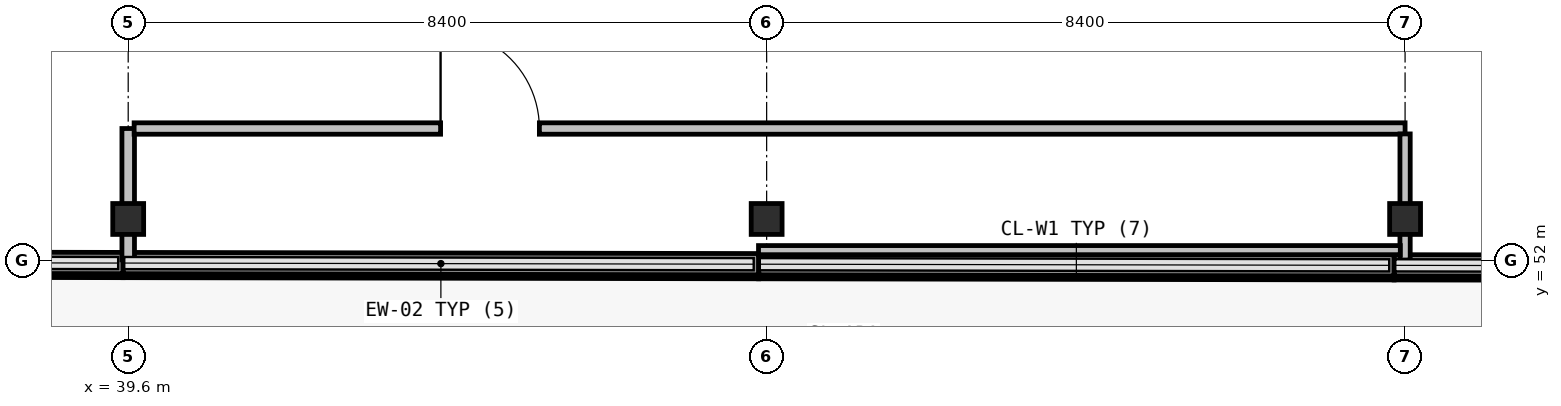
"""IFC4 building model, lengths in metres.
Left out: names, types, materials, properties, quantities, classifications, styles, units other than length and angle.
Written with IfcOpenShell. Run it as: python <this file> out.ifc"""

import sys

from ifc_helpers import new_model, si_unit, direction, frame, frame_2d, origin, origin_2d, place, context, subcontext, project, spatial, rectangle, hollow_circle, extrude, element, fill, save


model = new_model("IFC4")
c1 = context("Model", 3, precision=1e-05, world=origin(), true_north=direction((0.0, 1.0)))
c2 = subcontext(c1, "Body", "Model", "MODEL_VIEW")
j1 = project(units=[si_unit("LENGTHUNIT", "METRE"), si_unit("PLANEANGLEUNIT", "RADIAN")], contexts=[c1])
p1 = place(None, origin())
s1 = spatial("IfcSite", under=j1, at=p1, CompositionType="ELEMENT")
p2 = place(p1, origin())
s2 = spatial("IfcBuilding", under=s1, at=p2, CompositionType="ELEMENT")
p3 = place(p2, origin())
s3 = spatial("IfcBuildingStorey", under=s2, at=p3, CompositionType="ELEMENT", Elevation=0.0)
for number, where, z_axis, x_axis in (
    (1, (39.6, 52.55, 0.0), (0.0, 0.0, 1.0), (1.0, 0.0, 0.0)),
    (2, (48.0, 52.55, 0.0), (0.0, 0.0, 1.0), (1.0, 0.0, 0.0)),
    (3, (56.4, 52.55, 0.0), (0.0, 0.0, 1.0), (1.0, 0.0, 0.0)),
):
    element("IfcColumn", number, at=place(p3, frame(where, z_axis=z_axis, x_axis=x_axis)), inside=s3, PredefinedType="COLUMN", context=c2, shape_type="SweptSolid", body=[
        extrude(hollow_circle(Radius=0.203, WallThickness=0.016, at=origin_2d()), origin(), (0.0, 0.0, 1.0), 5.4),
    ])
p4 = place(p3, frame((64.616, 51.925, 0.0), z_axis=(0.0, 0.0, 1.0), x_axis=(-0.999998412501, 0.001781851468, 0.0)))
e4 = element("IfcWall", 4, at=p4, inside=s3, PredefinedType="SOLIDWALL", context=c2, shape_type="SweptSolid", body=[
    extrude(rectangle(XDim=8.358, YDim=0.28, at=frame_2d((4.179, 0.0))), origin(), (0.0, 0.0, 1.0), 0.94),
])
p5 = place(p3, frame((56.254, 51.94, 0.0), z_axis=(0.0, 0.0, 1.0), x_axis=(-0.999998359642, 0.001811273687, 0.0)))
e5 = element("IfcWall", 5, at=p5, inside=s3, PredefinedType="SOLIDWALL", context=c2, shape_type="SweptSolid", body=[
    extrude(rectangle(XDim=8.357, YDim=0.28, at=frame_2d((4.178, 0.0))), origin(), (0.0, 0.0, 1.0), 0.94),
])
p6 = place(p3, frame((47.893, 51.955, 0.0), z_axis=(0.0, 0.0, 1.0), x_axis=(-0.999998412594, 0.001781799421, 0.0)))
e6 = element("IfcWall", 6, at=p6, inside=s3, PredefinedType="SOLIDWALL", context=c2, shape_type="SweptSolid", body=[
    extrude(rectangle(XDim=8.358, YDim=0.28, at=frame_2d((4.179, 0.0))), origin(), (0.0, 0.0, 1.0), 0.94),
])
p7 = place(p3, frame((39.531, 51.97, 0.0), z_axis=(0.0, 0.0, 1.0), x_axis=(-0.999998360026, 0.001811062053, 0.0)))
e7 = element("IfcWall", 7, at=p7, inside=s3, PredefinedType="SOLIDWALL", context=c2, shape_type="SweptSolid", body=[
    extrude(rectangle(XDim=8.358, YDim=0.28, at=frame_2d((4.179, 0.0))), origin(), (0.0, 0.0, 1.0), 0.94),
])
p8 = place(p3, frame((39.6, 52.012, 0.0), z_axis=(0.0, 0.0, 1.0), x_axis=(0.0, 1.0, 0.0)))
e8 = element("IfcWall", 8, at=p8, inside=s3, PredefinedType="PARTITIONING", context=c2, shape_type="SweptSolid", body=[
    extrude(rectangle(XDim=1.728, YDim=0.165, at=frame_2d((0.864, 0.0))), origin(), (0.0, 0.0, 1.0), 4.33),
])
p9 = place(p3, frame((39.678, 53.74, 0.0), z_axis=(0.0, 0.0, 1.0), x_axis=(1.0, 0.0, 0.0)))
e9 = element("IfcWall", 9, at=p9, inside=s3, PredefinedType="PARTITIONING", context=c2, shape_type="SweptSolid", body=[
    extrude(rectangle(XDim=16.722, YDim=0.15, at=frame_2d((8.361, 0.0))), origin(), (0.0, 0.0, 1.0), 5.08),
])
p10 = place(p9, frame((4.032, 0.0, 0.0)))
e10 = element("IfcOpeningElement", 10, at=p10, cuts=e9, PredefinedType="OPENING", context=c2, shape_type="SweptSolid", body=[
    extrude(rectangle(XDim=1.3, YDim=2.15, at=frame_2d((0.65, 1.075))), frame((0.0, 0.085, 0.0), z_axis=(0.0, -1.0, 0.0), x_axis=(1.0, 0.0, 0.0)), (0.0, 0.0, 1.0), 0.17),
])
p11 = place(p3, frame((56.4, 53.669, 0.0), z_axis=(0.0, 0.0, 1.0), x_axis=(0.0, -1.0, 0.0)))
e11 = element("IfcWall", 11, at=p11, inside=s3, PredefinedType="PARTITIONING", context=c2, shape_type="SweptSolid", body=[
    extrude(rectangle(XDim=1.659, YDim=0.135, at=frame_2d((0.83, 0.0))), origin(), (0.0, 0.0, 1.0), 4.76),
])
p12 = place(p3, frame((56.337, 52.14, 0.0), z_axis=(0.0, 0.0, 1.0), x_axis=(-1.0, 0.0, 0.0)))
e12 = element("IfcWall", 12, at=p12, inside=s3, PredefinedType="PARTITIONING", context=c2, shape_type="SweptSolid", body=[
    extrude(rectangle(XDim=8.444, YDim=0.12, at=frame_2d((4.222, 0.0))), origin(), (0.0, 0.0, 1.0), 5.08),
])
p13 = place(p10, origin())
e13 = element("IfcDoor", 13, at=p13, inside=s3, OperationType="SINGLE_SWING_RIGHT", PredefinedType="DOOR", context=c2, shape_type="SweptSolid", body=[
    extrude(rectangle(XDim=1.3, YDim=2.15, at=frame_2d((0.65, 1.075))), frame((0.0, 0.025, 0.0), z_axis=(0.0, -1.0, 0.0), x_axis=(1.0, 0.0, 0.0)), (0.0, 0.0, 1.0), 0.05),
])
fill(e10, e13)
save(model, sys.argv[1])
